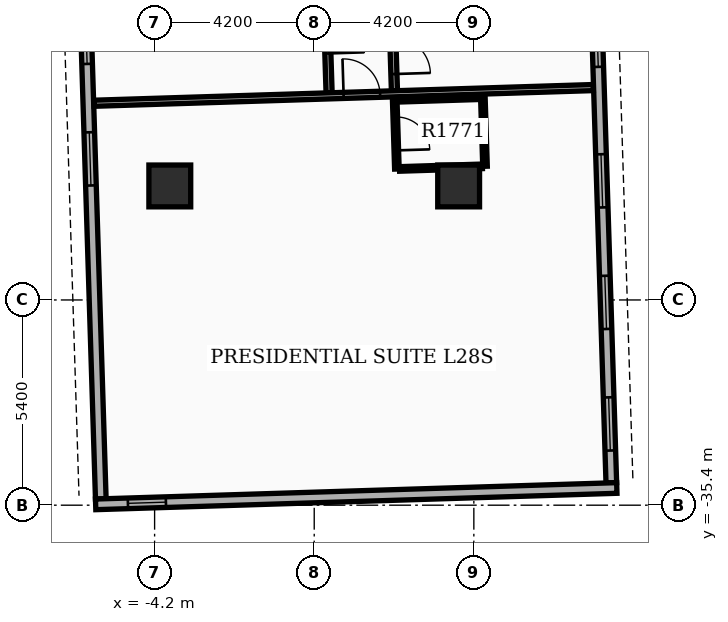
"""IFC4 building model, lengths in metres.
Left out: names, types, materials, properties, quantities, classifications, styles, units other than length and angle.
Written with IfcOpenShell. Run it as: python <this file> out.ifc"""

import sys

from ifc_helpers import new_model, si_unit, direction, frame, frame_2d, origin, origin_2d, place, context, subcontext, project, spatial, rectangle, extrude, element, fill, save


model = new_model("IFC4")
c1 = context("Model", 3, precision=1e-05, world=origin(), true_north=direction((0.0, 1.0)))
c2 = subcontext(c1, "Body", "Model", "MODEL_VIEW")
j1 = project(units=[si_unit("LENGTHUNIT", "METRE"), si_unit("PLANEANGLEUNIT", "RADIAN")], contexts=[c1])
p1 = place(None, origin())
s1 = spatial("IfcSite", under=j1, at=p1, CompositionType="ELEMENT")
p2 = place(p1, origin())
s2 = spatial("IfcBuilding", under=s1, at=p2, CompositionType="ELEMENT")
p3 = place(p2, frame((0.0, 0.0, 112.5)))
s3 = spatial("IfcBuildingStorey", under=s2, at=p3, CompositionType="ELEMENT", Elevation=112.5)
for number, where, z_axis, x_axis in (
    (1, (-3.8, -27.0, 0.0), (0.0, 0.0, 1.0), (1.0, 0.0, 0.0)),
    (2, (3.8, -27.0, 0.0), (0.0, 0.0, 1.0), (1.0, 0.0, 0.0)),
):
    element("IfcColumn", number, at=place(p3, frame(where, z_axis=z_axis, x_axis=x_axis)), inside=s3, PredefinedType="COLUMN", context=c2, shape_type="SweptSolid", body=[
        extrude(rectangle(XDim=1.1, YDim=1.1, at=origin_2d()), origin(), (0.0, 0.0, 1.0), 3.9),
    ])
p4 = place(p3, frame((-6.247, -15.144, 0.0), z_axis=(0.0, 0.0, 1.0), x_axis=(0.031398187845, -0.999506955354, 0.0)))
e3 = element("IfcWall", 3, at=p4, inside=s3, PredefinedType="STANDARD", context=c2, shape_type="SweptSolid", body=[
    extrude(rectangle(XDim=20.1, YDim=0.28, at=frame_2d((10.05, 0.0))), origin(), (0.0, 0.0, 1.0), 2.97),
])
p5 = place(p4, frame((0.85, 0.0, 0.8)))
e4 = element("IfcOpeningElement", 4, at=p5, cuts=e3, PredefinedType="OPENING", context=c2, shape_type="SweptSolid", body=[
    extrude(rectangle(XDim=1.4, YDim=1.6, at=frame_2d((0.7, 0.8))), frame((0.0, 0.15, 0.0), z_axis=(0.0, -1.0, 0.0), x_axis=(1.0, 0.0, 0.0)), (0.0, 0.0, 1.0), 0.3),
])
p6 = place(p4, frame((4.05, 0.0, 0.8)))
e5 = element("IfcOpeningElement", 5, at=p6, cuts=e3, PredefinedType="OPENING", context=c2, shape_type="SweptSolid", body=[
    extrude(rectangle(XDim=1.4, YDim=1.6, at=frame_2d((0.7, 0.8))), frame((0.0, 0.15, 0.0), z_axis=(0.0, -1.0, 0.0), x_axis=(1.0, 0.0, 0.0)), (0.0, 0.0, 1.0), 0.3),
])
p7 = place(p4, frame((7.25, 0.0, 0.8)))
e6 = element("IfcOpeningElement", 6, at=p7, cuts=e3, PredefinedType="OPENING", context=c2, shape_type="SweptSolid", body=[
    extrude(rectangle(XDim=1.4, YDim=1.6, at=frame_2d((0.7, 0.8))), frame((0.0, 0.15, 0.0), z_axis=(0.0, -1.0, 0.0), x_axis=(1.0, 0.0, 0.0)), (0.0, 0.0, 1.0), 0.3),
])
p8 = place(p4, frame((10.45, 0.0, 0.8)))
e7 = element("IfcOpeningElement", 7, at=p8, cuts=e3, PredefinedType="OPENING", context=c2, shape_type="SweptSolid", body=[
    extrude(rectangle(XDim=1.4, YDim=1.6, at=frame_2d((0.7, 0.8))), frame((0.0, 0.15, 0.0), z_axis=(0.0, -1.0, 0.0), x_axis=(1.0, 0.0, 0.0)), (0.0, 0.0, 1.0), 0.3),
])
p9 = place(p3, frame((7.817, -34.812, 0.0), z_axis=(0.0, 0.0, 1.0), x_axis=(-0.031410322165, 0.999506574096, 0.0)))
e8 = element("IfcWall", 8, at=p9, inside=s3, PredefinedType="STANDARD", context=c2, shape_type="SweptSolid", body=[
    extrude(rectangle(XDim=20.1, YDim=0.28, at=frame_2d((10.05, 0.0))), origin(), (0.0, 0.0, 1.0), 2.97),
])
p10 = place(p9, frame((0.85, 0.0, 0.8)))
e9 = element("IfcOpeningElement", 9, at=p10, cuts=e8, PredefinedType="OPENING", context=c2, shape_type="SweptSolid", body=[
    extrude(rectangle(XDim=1.4, YDim=1.6, at=frame_2d((0.7, 0.8))), frame((0.0, 0.15, 0.0), z_axis=(0.0, -1.0, 0.0), x_axis=(1.0, 0.0, 0.0)), (0.0, 0.0, 1.0), 0.3),
])
p11 = place(p9, frame((4.05, 0.0, 0.8)))
e10 = element("IfcOpeningElement", 10, at=p11, cuts=e8, PredefinedType="OPENING", context=c2, shape_type="SweptSolid", body=[
    extrude(rectangle(XDim=1.4, YDim=1.6, at=frame_2d((0.7, 0.8))), frame((0.0, 0.15, 0.0), z_axis=(0.0, -1.0, 0.0), x_axis=(1.0, 0.0, 0.0)), (0.0, 0.0, 1.0), 0.3),
])
p12 = place(p9, frame((7.25, 0.0, 0.8)))
e11 = element("IfcOpeningElement", 11, at=p12, cuts=e8, PredefinedType="OPENING", context=c2, shape_type="SweptSolid", body=[
    extrude(rectangle(XDim=1.4, YDim=1.6, at=frame_2d((0.7, 0.8))), frame((0.0, 0.15, 0.0), z_axis=(0.0, -1.0, 0.0), x_axis=(1.0, 0.0, 0.0)), (0.0, 0.0, 1.0), 0.3),
])
p13 = place(p9, frame((10.95, 0.0, 0.8)))
e12 = element("IfcOpeningElement", 12, at=p13, cuts=e8, PredefinedType="OPENING", context=c2, shape_type="SweptSolid", body=[
    extrude(rectangle(XDim=1.4, YDim=1.6, at=frame_2d((0.7, 0.8))), frame((0.0, 0.15, 0.0), z_axis=(0.0, -1.0, 0.0), x_axis=(1.0, 0.0, 0.0)), (0.0, 0.0, 1.0), 0.3),
])
p14 = place(p3, frame((-5.752, -35.378, 0.0), z_axis=(0.0, 0.0, 1.0), x_axis=(0.999506679556, 0.031406966164, 0.0)))
e13 = element("IfcWall", 13, at=p14, inside=s3, PredefinedType="STANDARD", context=c2, shape_type="SweptSolid", body=[
    extrude(rectangle(XDim=13.72, YDim=0.28, at=frame_2d((6.86, 0.0))), origin(), (0.0, 0.0, 1.0), 2.97),
])
p15 = place(p14, frame((0.85, 0.0, 0.85)))
e14 = element("IfcOpeningElement", 14, at=p15, cuts=e13, PredefinedType="OPENING", context=c2, shape_type="SweptSolid", body=[
    extrude(rectangle(XDim=1.0, YDim=1.5, at=frame_2d((0.5, 0.75))), frame((0.0, 0.15, 0.0), z_axis=(0.0, -1.0, 0.0), x_axis=(1.0, 0.0, 0.0)), (0.0, 0.0, 1.0), 0.3),
])
p16 = place(p3, frame((1.806, -14.801, 0.0), z_axis=(0.0, 0.0, 1.0), x_axis=(0.031410762168, -0.999506560269, 0.0)))
e15 = element("IfcWall", 15, at=p16, inside=s3, PredefinedType="PARTITIONING", context=c2, shape_type="SweptSolid", body=[
    extrude(rectangle(XDim=9.7, YDim=0.16, at=frame_2d((4.85, 0.0))), origin(), (0.0, 0.0, 1.0), 2.96),
])
p17 = place(p16, frame((8.3, 0.0, 0.0)))
e16 = element("IfcOpeningElement", 16, at=p17, cuts=e15, PredefinedType="OPENING", context=c2, shape_type="SweptSolid", body=[
    extrude(rectangle(XDim=0.96, YDim=2.15, at=frame_2d((0.48, 1.075))), frame((0.0, 0.09, 0.0), z_axis=(0.0, -1.0, 0.0), x_axis=(1.0, 0.0, 0.0)), (0.0, 0.0, 1.0), 0.18),
])
p18 = place(p3, frame((0.087, -14.854, 0.0), z_axis=(0.0, 0.0, 1.0), x_axis=(0.031410762168, -0.999506560269, 0.0)))
e17 = element("IfcWall", 17, at=p18, inside=s3, PredefinedType="PARTITIONING", context=c2, shape_type="SweptSolid", body=[
    extrude(rectangle(XDim=9.7, YDim=0.16, at=frame_2d((4.85, 0.0))), origin(), (0.0, 0.0, 1.0), 2.96),
])
p19 = place(p18, frame((7.704, 0.0, 0.0)))
e18 = element("IfcOpeningElement", 18, at=p19, cuts=e17, PredefinedType="OPENING", context=c2, shape_type="SweptSolid", body=[
    extrude(rectangle(XDim=0.96, YDim=2.15, at=frame_2d((0.48, 1.075))), frame((0.0, 0.09, 0.0), z_axis=(0.0, -1.0, 0.0), x_axis=(1.0, 0.0, 0.0)), (0.0, 0.0, 1.0), 0.18),
])
p20 = place(p3, frame((-5.795, -24.824, 0.0), z_axis=(0.0, 0.0, 1.0), x_axis=(0.999507189267, 0.031390740738, 0.0)))
e19 = element("IfcWall", 19, at=p20, inside=s3, PredefinedType="PARTITIONING", context=c2, shape_type="SweptSolid", body=[
    extrude(rectangle(XDim=13.144, YDim=0.16, at=frame_2d((6.572, 0.0))), origin(), (0.0, 0.0, 1.0), 2.96),
])
p21 = place(p20, frame((6.572, 0.0, 0.0)))
e20 = element("IfcOpeningElement", 20, at=p21, cuts=e19, PredefinedType="OPENING", context=c2, shape_type="SweptSolid", body=[
    extrude(rectangle(XDim=0.96, YDim=2.15, at=frame_2d((0.48, 1.075))), frame((0.0, 0.09, 0.0), z_axis=(0.0, -1.0, 0.0), x_axis=(1.0, 0.0, 0.0)), (0.0, 0.0, 1.0), 0.18),
])
p22 = place(p3, frame((2.118, -24.736, 0.0), z_axis=(0.0, 0.0, 1.0), x_axis=(0.03152371574, -0.999503004171, 0.0)))
e21 = element("IfcWall", 21, at=p22, inside=s3, PredefinedType="PARTITIONING", context=c2, shape_type="SweptSolid", body=[
    extrude(rectangle(XDim=1.82, YDim=0.12, at=frame_2d((0.91, 0.0))), origin(), (0.0, 0.0, 1.0), 2.96),
])
p23 = place(p22, frame((0.45, 0.0, 0.0)))
e22 = element("IfcOpeningElement", 22, at=p23, cuts=e21, PredefinedType="OPENING", context=c2, shape_type="SweptSolid", body=[
    extrude(rectangle(XDim=0.88, YDim=2.1, at=frame_2d((0.44, 1.05))), frame((0.0, 0.07, 0.0), z_axis=(0.0, -1.0, 0.0), x_axis=(1.0, 0.0, 0.0)), (0.0, 0.0, 1.0), 0.14),
])
p24 = place(p3, frame((4.437, -24.663, 0.0), z_axis=(0.0, 0.0, 1.0), x_axis=(0.031255692016, -0.999511421504, 0.0)))
e23 = element("IfcWall", 23, at=p24, inside=s3, PredefinedType="PARTITIONING", context=c2, shape_type="SweptSolid", body=[
    extrude(rectangle(XDim=1.82, YDim=0.12, at=frame_2d((0.91, 0.0))), origin(), (0.0, 0.0, 1.0), 2.96),
])
for number, where, z_axis, x_axis in (
    (24, (2.188, -24.733, 0.0), (0.0, 0.0, 1.0), (1.0, 0.031, 0.0)),
    (25, (2.245, -26.552, 0.0), (0.0, 0.0, 1.0), (1.0, 0.031, 0.0)),
):
    element("IfcWall", number, at=place(p3, frame(where, z_axis=z_axis, x_axis=x_axis)), inside=s3, PredefinedType="PARTITIONING", context=c2, shape_type="SweptSolid", body=[
        extrude(rectangle(XDim=2.18, YDim=0.12, at=frame_2d((1.09, 0.0))), origin(), (0.0, 0.0, 1.0), 2.96),
    ])
p25 = place(p7, origin())
e26 = element("IfcWindow", 26, at=p25, inside=s3, PartitioningType="SINGLE_PANEL", PredefinedType="WINDOW", context=c2, shape_type="SweptSolid", body=[
    extrude(rectangle(XDim=1.4, YDim=1.6, at=frame_2d((0.7, 0.8))), frame((0.0, 0.03, 0.0), z_axis=(0.0, -1.0, 0.0), x_axis=(1.0, 0.0, 0.0)), (0.0, 0.0, 1.0), 0.06),
])
fill(e6, e26)
p26 = place(p8, origin())
e27 = element("IfcWindow", 27, at=p26, inside=s3, PartitioningType="SINGLE_PANEL", PredefinedType="WINDOW", context=c2, shape_type="SweptSolid", body=[
    extrude(rectangle(XDim=1.4, YDim=1.6, at=frame_2d((0.7, 0.8))), frame((0.0, 0.03, 0.0), z_axis=(0.0, -1.0, 0.0), x_axis=(1.0, 0.0, 0.0)), (0.0, 0.0, 1.0), 0.06),
])
fill(e7, e27)
p27 = place(p10, origin())
e28 = element("IfcWindow", 28, at=p27, inside=s3, PartitioningType="SINGLE_PANEL", PredefinedType="WINDOW", context=c2, shape_type="SweptSolid", body=[
    extrude(rectangle(XDim=1.4, YDim=1.6, at=frame_2d((0.7, 0.8))), frame((0.0, 0.03, 0.0), z_axis=(0.0, -1.0, 0.0), x_axis=(1.0, 0.0, 0.0)), (0.0, 0.0, 1.0), 0.06),
])
fill(e9, e28)
p28 = place(p11, origin())
e29 = element("IfcWindow", 29, at=p28, inside=s3, PartitioningType="SINGLE_PANEL", PredefinedType="WINDOW", context=c2, shape_type="SweptSolid", body=[
    extrude(rectangle(XDim=1.4, YDim=1.6, at=frame_2d((0.7, 0.8))), frame((0.0, 0.03, 0.0), z_axis=(0.0, -1.0, 0.0), x_axis=(1.0, 0.0, 0.0)), (0.0, 0.0, 1.0), 0.06),
])
fill(e10, e29)
p29 = place(p12, origin())
e30 = element("IfcWindow", 30, at=p29, inside=s3, PartitioningType="SINGLE_PANEL", PredefinedType="WINDOW", context=c2, shape_type="SweptSolid", body=[
    extrude(rectangle(XDim=1.4, YDim=1.6, at=frame_2d((0.7, 0.8))), frame((0.0, 0.03, 0.0), z_axis=(0.0, -1.0, 0.0), x_axis=(1.0, 0.0, 0.0)), (0.0, 0.0, 1.0), 0.06),
])
fill(e11, e30)
p30 = place(p13, origin())
e31 = element("IfcWindow", 31, at=p30, inside=s3, PartitioningType="SINGLE_PANEL", PredefinedType="WINDOW", context=c2, shape_type="SweptSolid", body=[
    extrude(rectangle(XDim=1.4, YDim=1.6, at=frame_2d((0.7, 0.8))), frame((0.0, 0.03, 0.0), z_axis=(0.0, -1.0, 0.0), x_axis=(1.0, 0.0, 0.0)), (0.0, 0.0, 1.0), 0.06),
])
fill(e12, e31)
p31 = place(p15, origin())
e32 = element("IfcWindow", 32, at=p31, inside=s3, PartitioningType="SINGLE_PANEL", PredefinedType="WINDOW", context=c2, shape_type="SweptSolid", body=[
    extrude(rectangle(XDim=1.0, YDim=1.5, at=frame_2d((0.5, 0.75))), frame((0.0, 0.03, 0.0), z_axis=(0.0, -1.0, 0.0), x_axis=(1.0, 0.0, 0.0)), (0.0, 0.0, 1.0), 0.06),
])
fill(e14, e32)
p32 = place(p17, origin())
e33 = element("IfcDoor", 33, at=p32, inside=s3, OperationType="SINGLE_SWING_RIGHT", PredefinedType="DOOR", context=c2, shape_type="SweptSolid", body=[
    extrude(rectangle(XDim=0.96, YDim=2.15, at=frame_2d((0.48, 1.075))), frame((0.0, 0.025, 0.0), z_axis=(0.0, -1.0, 0.0), x_axis=(1.0, 0.0, 0.0)), (0.0, 0.0, 1.0), 0.05),
])
fill(e16, e33)
p33 = place(p19, origin())
e34 = element("IfcDoor", 34, at=p33, inside=s3, OperationType="SINGLE_SWING_RIGHT", PredefinedType="DOOR", context=c2, shape_type="SweptSolid", body=[
    extrude(rectangle(XDim=0.96, YDim=2.15, at=frame_2d((0.48, 1.075))), frame((0.0, 0.025, 0.0), z_axis=(0.0, -1.0, 0.0), x_axis=(1.0, 0.0, 0.0)), (0.0, 0.0, 1.0), 0.05),
])
fill(e18, e34)
p34 = place(p21, origin())
e35 = element("IfcDoor", 35, at=p34, inside=s3, OperationType="SINGLE_SWING_LEFT", PredefinedType="DOOR", context=c2, shape_type="SweptSolid", body=[
    extrude(rectangle(XDim=0.96, YDim=2.15, at=frame_2d((0.48, 1.075))), frame((0.0, 0.025, 0.0), z_axis=(0.0, -1.0, 0.0), x_axis=(1.0, 0.0, 0.0)), (0.0, 0.0, 1.0), 0.05),
])
fill(e20, e35)
p35 = place(p23, origin())
e36 = element("IfcDoor", 36, at=p35, inside=s3, OperationType="SINGLE_SWING_RIGHT", PredefinedType="DOOR", context=c2, shape_type="SweptSolid", body=[
    extrude(rectangle(XDim=0.88, YDim=2.1, at=frame_2d((0.44, 1.05))), frame((0.0, 0.025, 0.0), z_axis=(0.0, -1.0, 0.0), x_axis=(1.0, 0.0, 0.0)), (0.0, 0.0, 1.0), 0.05),
])
fill(e22, e36)
save(model, sys.argv[1])
